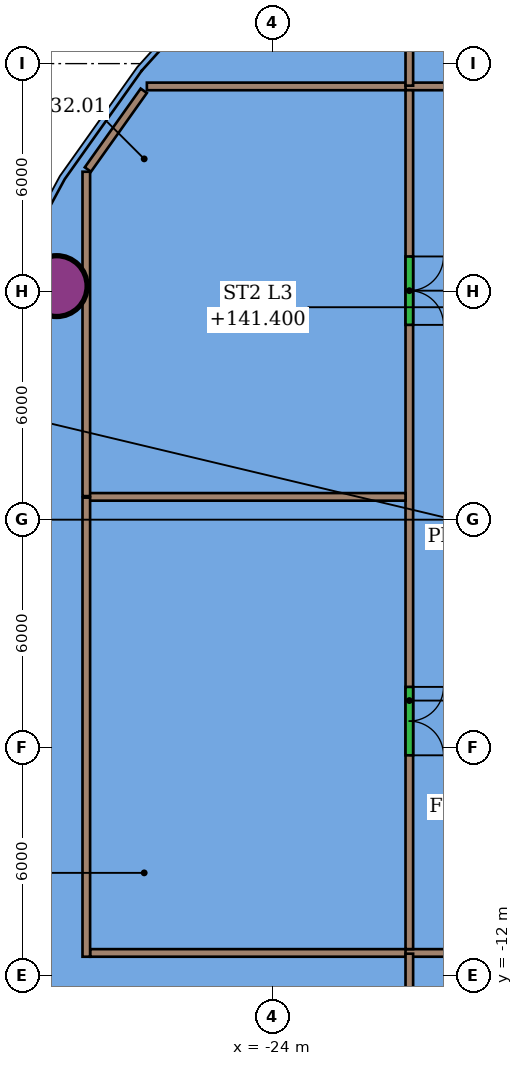
"""IFC4 building model, lengths in metres.
Left out: names, types, materials, properties, quantities, classifications, styles, units other than length and angle.
Written with IfcOpenShell. Run it as: python <this file> out.ifc"""

import sys

from ifc_helpers import new_model, si_unit, direction, frame, frame_2d, origin, origin_2d, place, context, subcontext, project, spatial, rectangle, hollow_circle, extrude, element, fill, save


model = new_model("IFC4")
c1 = context("Model", 3, precision=1e-05, world=origin(), true_north=direction((0.0, 1.0)))
c2 = subcontext(c1, "Body", "Model", "MODEL_VIEW")
j1 = project(units=[si_unit("LENGTHUNIT", "METRE"), si_unit("PLANEANGLEUNIT", "RADIAN")], contexts=[c1])
p1 = place(None, origin())
s1 = spatial("IfcSite", under=j1, at=p1, CompositionType="ELEMENT")
p2 = place(p1, origin())
s2 = spatial("IfcBuilding", under=s1, at=p2, CompositionType="ELEMENT")
p3 = place(p2, frame((0.0, 0.0, 135.4)))
s3 = spatial("IfcBuildingStorey", under=s2, at=p3, CompositionType="ELEMENT", Elevation=135.4)
p4 = place(p3, frame((-29.679, 6.146, 0.0), z_axis=(0.0, 0.0, 1.0), x_axis=(1.0, 0.0, 0.0)))
e1 = element("IfcColumn", 1, at=p4, inside=s3, PredefinedType="COLUMN", context=c2, shape_type="SweptSolid", body=[
    extrude(hollow_circle(Radius=0.8, WallThickness=0.055, at=origin_2d()), origin(), (0.0, 0.0, 1.0), 7.85),
])
p5 = place(p3, frame((-27.306, 11.4, 0.0), z_axis=(0.0, 0.0, 1.0), x_axis=(1.0, 0.0, 0.0)))
e2 = element("IfcWall", 2, at=p5, inside=s3, PredefinedType="PARTITIONING", context=c2, shape_type="SweptSolid", body=[
    extrude(rectangle(XDim=6.886, YDim=0.2, at=frame_2d((3.443, 0.0))), origin(), (0.0, 0.0, 1.0), 7.262),
])
p6 = place(p3, frame((8.5, 11.4, 0.0), z_axis=(0.0, 0.0, 1.0), x_axis=(-1.0, 0.0, 0.0)))
e3 = element("IfcWall", 3, at=p6, inside=s3, PredefinedType="PARTITIONING", context=c2, shape_type="SweptSolid", body=[
    extrude(rectangle(XDim=29.0, YDim=0.2, at=frame_2d((14.5, 0.0))), origin(), (0.0, 0.0, 1.0), 7.262),
])
p7 = place(p6, frame((23.5, 0.0, 0.0)))
e4 = element("IfcOpeningElement", 4, at=p7, cuts=e3, PredefinedType="OPENING", context=c2, shape_type="SweptSolid", body=[
    extrude(rectangle(XDim=1.8, YDim=2.4, at=frame_2d((0.9, 1.2))), frame((0.0, 0.11, 0.0), z_axis=(0.0, -1.0, 0.0), x_axis=(1.0, 0.0, 0.0)), (0.0, 0.0, 1.0), 0.22),
])
p8 = place(p6, frame((14.15, 0.0, 0.0)))
e5 = element("IfcOpeningElement", 5, at=p8, cuts=e3, PredefinedType="OPENING", context=c2, shape_type="SweptSolid", body=[
    extrude(rectangle(XDim=1.0, YDim=2.1, at=frame_2d((0.5, 1.05))), frame((0.0, 0.11, 0.0), z_axis=(0.0, -1.0, 0.0), x_axis=(1.0, 0.0, 0.0)), (0.0, 0.0, 1.0), 0.22),
])
p9 = place(p6, frame((1.1, 0.0, 0.0)))
e6 = element("IfcOpeningElement", 6, at=p9, cuts=e3, PredefinedType="OPENING", context=c2, shape_type="SweptSolid", body=[
    extrude(rectangle(XDim=1.8, YDim=2.4, at=frame_2d((0.9, 1.2))), frame((0.0, 0.11, 0.0), z_axis=(0.0, -1.0, 0.0), x_axis=(1.0, 0.0, 0.0)), (0.0, 0.0, 1.0), 0.22),
])
p10 = place(p3, frame((-28.8, -11.4, 0.0), z_axis=(0.0, 0.0, 1.0), x_axis=(1.0, 0.0, 0.0)))
e7 = element("IfcWall", 7, at=p10, inside=s3, PredefinedType="PARTITIONING", context=c2, shape_type="SweptSolid", body=[
    extrude(rectangle(XDim=8.38, YDim=0.2, at=frame_2d((4.19, 0.0))), origin(), (0.0, 0.0, 1.0), 7.262),
])
p11 = place(p3, frame((-20.5, -11.4, 0.0), z_axis=(0.0, 0.0, 1.0), x_axis=(1.0, 0.0, 0.0)))
e8 = element("IfcWall", 8, at=p11, inside=s3, PredefinedType="PARTITIONING", context=c2, shape_type="SweptSolid", body=[
    extrude(rectangle(XDim=29.0, YDim=0.2, at=frame_2d((14.5, 0.0))), origin(), (0.0, 0.0, 1.0), 7.262),
])
p12 = place(p11, frame((1.122, 0.0, 0.0)))
e9 = element("IfcOpeningElement", 9, at=p12, cuts=e8, PredefinedType="OPENING", context=c2, shape_type="SweptSolid", body=[
    extrude(rectangle(XDim=1.8, YDim=2.4, at=frame_2d((0.9, 1.2))), frame((0.0, 0.11, 0.0), z_axis=(0.0, -1.0, 0.0), x_axis=(1.0, 0.0, 0.0)), (0.0, 0.0, 1.0), 0.22),
])
p13 = place(p11, frame((14.1, 0.0, 0.0)))
e10 = element("IfcOpeningElement", 10, at=p13, cuts=e8, PredefinedType="OPENING", context=c2, shape_type="SweptSolid", body=[
    extrude(rectangle(XDim=1.0, YDim=2.1, at=frame_2d((0.5, 1.05))), frame((0.0, 0.11, 0.0), z_axis=(0.0, -1.0, 0.0), x_axis=(1.0, 0.0, 0.0)), (0.0, 0.0, 1.0), 0.22),
])
p14 = place(p11, frame((23.1, 0.0, 0.0)))
e11 = element("IfcOpeningElement", 11, at=p14, cuts=e8, PredefinedType="OPENING", context=c2, shape_type="SweptSolid", body=[
    extrude(rectangle(XDim=1.8, YDim=2.4, at=frame_2d((0.9, 1.2))), frame((0.0, 0.11, 0.0), z_axis=(0.0, -1.0, 0.0), x_axis=(1.0, 0.0, 0.0)), (0.0, 0.0, 1.0), 0.22),
])
p15 = place(p3, frame((-20.4, -19.8, 0.0), z_axis=(0.0, 0.0, 1.0), x_axis=(0.0, 1.0, 0.0)))
e12 = element("IfcWall", 12, at=p15, inside=s3, PredefinedType="PARTITIONING", context=c2, shape_type="SweptSolid", body=[
    extrude(rectangle(XDim=8.38, YDim=0.2, at=frame_2d((4.19, 0.0))), origin(), (0.0, 0.0, 1.0), 7.262),
])
p16 = place(p3, frame((-20.4, 11.3, 0.0), z_axis=(0.0, 0.0, 1.0), x_axis=(0.0, -1.0, 0.0)))
e13 = element("IfcWall", 13, at=p16, inside=s3, PredefinedType="PARTITIONING", context=c2, shape_type="SweptSolid", body=[
    extrude(rectangle(XDim=22.6, YDim=0.2, at=frame_2d((11.3, 0.0))), origin(), (0.0, 0.0, 1.0), 7.262),
])
p17 = place(p16, frame((15.7, 0.0, 0.0)))
e14 = element("IfcOpeningElement", 14, at=p17, cuts=e13, PredefinedType="OPENING", context=c2, shape_type="SweptSolid", body=[
    extrude(rectangle(XDim=1.8, YDim=2.4, at=frame_2d((0.9, 1.2))), frame((0.0, 0.11, 0.0), z_axis=(0.0, -1.0, 0.0), x_axis=(1.0, 0.0, 0.0)), (0.0, 0.0, 1.0), 0.22),
])
p18 = place(p16, frame((4.374, 0.0, 0.0)))
e15 = element("IfcOpeningElement", 15, at=p18, cuts=e13, PredefinedType="OPENING", context=c2, shape_type="SweptSolid", body=[
    extrude(rectangle(XDim=1.8, YDim=2.4, at=frame_2d((0.9, 1.2))), frame((0.0, 0.11, 0.0), z_axis=(0.0, -1.0, 0.0), x_axis=(1.0, 0.0, 0.0)), (0.0, 0.0, 1.0), 0.22),
])
p19 = place(p3, frame((-20.4, 11.42, 0.0), z_axis=(0.0, 0.0, 1.0), x_axis=(0.0, 1.0, 0.0)))
e16 = element("IfcWall", 16, at=p19, inside=s3, PredefinedType="PARTITIONING", context=c2, shape_type="SweptSolid", body=[
    extrude(rectangle(XDim=6.379, YDim=0.2, at=frame_2d((3.19, 0.0))), origin(), (0.0, 0.0, 1.0), 7.262),
])
p20 = place(p3, frame((-28.9, 0.6, 0.0), z_axis=(0.0, 0.0, 1.0), x_axis=(1.0, 0.0, 0.0)))
e17 = element("IfcWall", 17, at=p20, inside=s3, PredefinedType="PARTITIONING", context=c2, shape_type="SweptSolid", body=[
    extrude(rectangle(XDim=8.4, YDim=0.2, at=frame_2d((4.2, 0.0))), origin(), (0.0, 0.0, 1.0), 7.262),
])
p21 = place(p3, frame((-28.9, -11.5, 0.0), z_axis=(0.0, 0.0, 1.0), x_axis=(0.0, 1.0, 0.0)))
e18 = element("IfcWall", 18, at=p21, inside=s3, PredefinedType="PARTITIONING", context=c2, shape_type="SweptSolid", body=[
    extrude(rectangle(XDim=12.08, YDim=0.2, at=frame_2d((6.04, 0.0))), origin(), (0.0, 0.0, 1.0), 7.262),
])
p22 = place(p3, frame((-28.9, 0.62, 0.0), z_axis=(0.0, 0.0, 1.0), x_axis=(0.0, 1.0, 0.0)))
e19 = element("IfcWall", 19, at=p22, inside=s3, PredefinedType="PARTITIONING", context=c2, shape_type="SweptSolid", body=[
    extrude(rectangle(XDim=8.535, YDim=0.2, at=frame_2d((4.268, 0.0))), origin(), (0.0, 0.0, 1.0), 7.262),
])
p23 = place(p3, frame((-28.859, 9.213, 0.0), z_axis=(0.0, 0.0, 1.0), x_axis=(0.578936610042, 0.815372553838, 0.0)))
e20 = element("IfcWall", 20, at=p23, inside=s3, PredefinedType="PARTITIONING", context=c2, shape_type="SweptSolid", body=[
    extrude(rectangle(XDim=2.541, YDim=0.2, at=frame_2d((1.271, 0.0))), origin(), (0.0, 0.0, 1.0), 7.262),
])
p24 = place(p17, origin())
e21 = element("IfcDoor", 21, at=p24, inside=s3, OperationType="DOUBLE_DOOR_SINGLE_SWING", PredefinedType="DOOR", context=c2, shape_type="SweptSolid", body=[
    extrude(rectangle(XDim=1.8, YDim=2.4, at=frame_2d((0.9, 1.2))), frame((0.0, 0.025, 0.0), z_axis=(0.0, -1.0, 0.0), x_axis=(1.0, 0.0, 0.0)), (0.0, 0.0, 1.0), 0.05),
])
fill(e14, e21)
p25 = place(p18, origin())
e22 = element("IfcDoor", 22, at=p25, inside=s3, OperationType="DOUBLE_DOOR_SINGLE_SWING", PredefinedType="DOOR", context=c2, shape_type="SweptSolid", body=[
    extrude(rectangle(XDim=1.8, YDim=2.4, at=frame_2d((0.9, 1.2))), frame((0.0, 0.025, 0.0), z_axis=(0.0, -1.0, 0.0), x_axis=(1.0, 0.0, 0.0)), (0.0, 0.0, 1.0), 0.05),
])
fill(e15, e22)
save(model, sys.argv[1])
